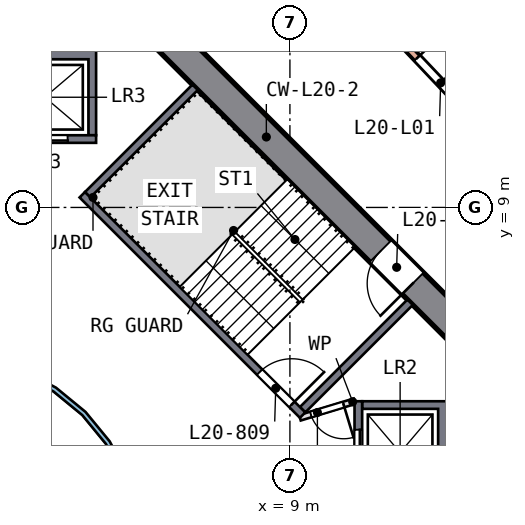
"""IFC4 building model, lengths in metres.
Left out: names, types, materials, properties, quantities, classifications, styles, units other than length and angle.
Written with IfcOpenShell. Run it as: python <this file> out.ifc"""

import sys

from ifc_helpers import new_model, si_unit, direction, frame, frame_2d, origin, place, context, subcontext, project, spatial, polyline, rectangle, outline, extrude, element, fill, save


model = new_model("IFC4")
c1 = context("Model", 3, precision=1e-05, world=origin(), true_north=direction((0.0, 1.0)))
c2 = subcontext(c1, "Body", "Model", "MODEL_VIEW")
j1 = project(units=[si_unit("LENGTHUNIT", "METRE"), si_unit("PLANEANGLEUNIT", "RADIAN")], contexts=[c1])
p1 = place(None, origin())
s1 = spatial("IfcSite", under=j1, at=p1, CompositionType="ELEMENT")
p2 = place(p1, origin())
s2 = spatial("IfcBuilding", under=s1, at=p2, CompositionType="ELEMENT")
p3 = place(p2, frame((0.0, 0.0, 89.5)))
s3 = spatial("IfcBuildingStorey", under=s2, at=p3, CompositionType="ELEMENT", Elevation=89.5)
p4 = place(p3, frame((13.717, 5.516, 0.0), z_axis=(0.0, 0.0, 1.0), x_axis=(-0.707106781, 0.707106781, 0.0)))
e1 = element("IfcWall", 1, at=p4, inside=s3, PredefinedType="SHEAR", context=c2, shape_type="SweptSolid", body=[
    extrude(rectangle(XDim=11.598, YDim=0.8, at=frame_2d((5.799, 0.0))), origin(), (0.0, 0.0, 1.0), 3.5),
])
p5 = place(p4, frame((2.099, 0.0, 0.0)))
e2 = element("IfcOpeningElement", 2, at=p5, cuts=e1, PredefinedType="OPENING", context=c2, shape_type="SweptSolid", body=[
    extrude(rectangle(XDim=1.2, YDim=2.1, at=frame_2d((0.6, 1.05))), frame((0.0, 0.41, 0.0), z_axis=(0.0, -1.0, 0.0), x_axis=(1.0, 0.0, 0.0)), (0.0, 0.0, 1.0), 0.82),
])
p6 = place(p3, frame((8.498, 16.999, 0.0), z_axis=(0.0, 0.0, 1.0), x_axis=(0.687585757, -0.726103179, 0.0)))
e3 = element("IfcWall", 3, at=p6, inside=s3, PredefinedType="SOLIDWALL", context=c2, shape_type="SweptSolid", body=[
    extrude(rectangle(XDim=13.0, YDim=0.2, at=frame_2d((6.5, 0.0))), origin(), (0.0, 0.0, 1.0), 3.19),
])
p7 = place(p6, frame((5.6, 0.0, 0.0)))
e4 = element("IfcOpeningElement", 4, at=p7, cuts=e3, PredefinedType="OPENING", context=c2, shape_type="SweptSolid", body=[
    extrude(rectangle(XDim=1.8, YDim=2.4, at=frame_2d((0.9, 1.2))), frame((0.0, 0.11, 0.0), z_axis=(0.0, -1.0, 0.0), x_axis=(1.0, 0.0, 0.0)), (0.0, 0.0, 1.0), 0.22),
])
p8 = place(p3, origin())
e5 = element("IfcWall", 5, at=p8, inside=s3, PredefinedType="SOLIDWALL", context=c2, shape_type="SweptSolid", body=[
    extrude(outline(polyline([(13.2, 3.9), (13.2, 1.2), (10.9, 1.2), (10.9, 1.4), (12.9, 1.4), (12.9, 3.7), (10.9, 3.7), (10.9, 3.9), (13.2, 3.9)])), origin(), (0.0, 0.0, 1.0), 3.19),
])
p9 = place(p3, frame((10.8, 1.2, 0.0), z_axis=(0.0, 0.0, 1.0), x_axis=(0.0, 1.0, 0.0)))
e6 = element("IfcWall", 6, at=p9, inside=s3, PredefinedType="SOLIDWALL", context=c2, shape_type="SweptSolid", body=[
    extrude(rectangle(XDim=2.7, YDim=0.2, at=frame_2d((1.35, 0.0))), origin(), (0.0, 0.0, 1.0), 3.19),
])
p10 = place(p9, frame((0.75, 0.0, 0.0)))
e7 = element("IfcOpeningElement", 7, at=p10, cuts=e6, PredefinedType="OPENING", context=c2, shape_type="SweptSolid", body=[
    extrude(rectangle(XDim=1.2, YDim=2.1, at=frame_2d((0.6, 1.05))), frame((0.0, 0.11, 0.0), z_axis=(0.0, -1.0, 0.0), x_axis=(1.0, 0.0, 0.0)), (0.0, 0.0, 1.0), 0.22),
])
p11 = place(p3, origin())
e8 = element("IfcWall", 8, at=p11, inside=s3, PredefinedType="SOLIDWALL", context=c2, shape_type="SweptSolid", body=[
    extrude(outline(polyline([(3.9, 13.2), (3.9, 10.9), (3.7, 10.9), (3.7, 12.9), (1.4, 12.9), (1.4, 10.9), (1.2, 10.9), (1.2, 13.2), (3.9, 13.2)])), origin(), (0.0, 0.0, 1.0), 3.19),
])
p12 = place(p3, frame((1.2, 10.8, 0.0), z_axis=(0.0, 0.0, 1.0), x_axis=(1.0, 0.0, 0.0)))
e9 = element("IfcWall", 9, at=p12, inside=s3, PredefinedType="SOLIDWALL", context=c2, shape_type="SweptSolid", body=[
    extrude(rectangle(XDim=2.7, YDim=0.2, at=frame_2d((1.35, 0.0))), origin(), (0.0, 0.0, 1.0), 3.19),
])
p13 = place(p12, frame((0.75, 0.0, 0.0)))
e10 = element("IfcOpeningElement", 10, at=p13, cuts=e9, PredefinedType="OPENING", context=c2, shape_type="SweptSolid", body=[
    extrude(rectangle(XDim=1.2, YDim=2.1, at=frame_2d((0.6, 1.05))), frame((0.0, 0.11, 0.0), z_axis=(0.0, -1.0, 0.0), x_axis=(1.0, 0.0, 0.0)), (0.0, 0.0, 1.0), 0.22),
])
p14 = place(p3, frame((3.535, 9.334, 0.0), z_axis=(0.0, 0.0, 1.0), x_axis=(0.707106781, -0.707106781, 0.0)))
e11 = element("IfcWall", 11, at=p14, inside=s3, PredefinedType="SOLIDWALL", context=c2, shape_type="SweptSolid", body=[
    extrude(rectangle(XDim=8.2, YDim=0.2, at=frame_2d((4.1, 0.0))), origin(), (0.0, 0.0, 1.0), 3.19),
])
p15 = place(p14, frame((6.6, 0.0, 0.0)))
e12 = element("IfcOpeningElement", 12, at=p15, cuts=e11, PredefinedType="OPENING", context=c2, shape_type="SweptSolid", body=[
    extrude(rectangle(XDim=1.2, YDim=2.1, at=frame_2d((0.6, 1.05))), frame((0.0, 0.11, 0.0), z_axis=(0.0, -1.0, 0.0), x_axis=(1.0, 0.0, 0.0)), (0.0, 0.0, 1.0), 0.22),
])
for number, where, z_axis, x_axis in (
    (13, (9.334, 3.677, 0.0), (0.0, 0.0, 1.0), (0.707, 0.707, 0.0)),
    (14, (3.677, 9.334, 0.0), (0.0, 0.0, 1.0), (0.707, 0.707, 0.0)),
):
    element("IfcWall", number, at=place(p3, frame(where, z_axis=z_axis, x_axis=x_axis)), inside=s3, PredefinedType="SOLIDWALL", context=c2, shape_type="SweptSolid", body=[
        extrude(rectangle(XDim=4.0, YDim=0.2, at=frame_2d((2.0, 0.0))), origin(), (0.0, 0.0, 1.0), 3.19),
    ])
p16 = place(p3, frame((10.7, 3.9, 0.0), z_axis=(0.0, 0.0, 1.0), x_axis=(-0.957084567, -0.289808785, 0.0)))
e15 = element("IfcWall", 15, at=p16, inside=s3, PredefinedType="PARTITIONING", context=c2, shape_type="SweptSolid", body=[
    extrude(rectangle(XDim=1.501, YDim=0.15, at=frame_2d((0.75, 0.0))), origin(), (0.0, 0.0, 1.0), 3.19),
])
p17 = place(p16, frame((0.301, 0.0, 0.0)))
e16 = element("IfcOpeningElement", 16, at=p17, cuts=e15, PredefinedType="OPENING", context=c2, shape_type="SweptSolid", body=[
    extrude(rectangle(XDim=0.9, YDim=2.1, at=frame_2d((0.45, 1.05))), frame((0.0, 0.085, 0.0), z_axis=(0.0, -1.0, 0.0), x_axis=(1.0, 0.0, 0.0)), (0.0, 0.0, 1.0), 0.17),
])
p18 = place(p3, origin())
e17 = element("IfcWall", 17, at=p18, inside=s3, PredefinedType="SOLIDWALL", context=c2, shape_type="SweptSolid", body=[
    extrude(outline(polyline([(5.021, -0.999), (4.73, -1.959), (4.257, -2.844), (3.62, -3.62), (2.844, -4.257), (1.959, -4.73), (0.999, -5.021), (0.0, -5.12), (-0.999, -5.021), (-1.959, -4.73), (-2.844, -4.257), (-3.62, -3.62), (-4.257, -2.844), (-4.73, -1.959), (-5.021, -0.999), (-5.12, 0.0), (-5.021, 0.999), (-4.73, 1.959), (-4.257, 2.844), (-3.62, 3.62), (-2.844, 4.257), (-1.959, 4.73), (-0.999, 5.021), (0.0, 5.12), (0.999, 5.021), (1.959, 4.73), (2.844, 4.257), (3.62, 3.62), (4.257, 2.844), (4.73, 1.959), (5.021, 0.999), (5.12, 0.0), (5.021, -0.999)]), holes=[polyline([(4.904, 0.976), (4.619, 1.913), (4.157, 2.778), (3.535, 3.535), (2.778, 4.157), (1.913, 4.619), (0.976, 4.904), (0.0, 5.0), (-0.976, 4.904), (-1.913, 4.619), (-2.778, 4.157), (-3.535, 3.535), (-4.157, 2.778), (-4.619, 1.913), (-4.904, 0.976), (-5.0, 0.0), (-4.904, -0.976), (-4.619, -1.913), (-4.157, -2.778), (-3.535, -3.535), (-2.778, -4.157), (-1.913, -4.619), (-0.976, -4.904), (0.0, -5.0), (0.976, -4.904), (1.913, -4.619), (2.778, -4.157), (3.535, -3.535), (4.157, -2.778), (4.619, -1.913), (4.904, -0.976), (5.0, 0.0), (4.904, 0.976)])]), origin(), (0.0, 0.0, 1.0), 3.19),
])
p19 = place(p7, origin())
e18 = element("IfcDoor", 18, at=p19, inside=s3, OperationType="DOUBLE_DOOR_SINGLE_SWING", PredefinedType="DOOR", context=c2, shape_type="SweptSolid", body=[
    extrude(rectangle(XDim=1.8, YDim=2.4, at=frame_2d((0.9, 1.2))), frame((0.0, 0.025, 0.0), z_axis=(0.0, -1.0, 0.0), x_axis=(1.0, 0.0, 0.0)), (0.0, 0.0, 1.0), 0.05),
])
fill(e4, e18)
p20 = place(p10, origin())
e19 = element("IfcDoor", 19, at=p20, inside=s3, OperationType="DOUBLE_DOOR_SLIDING", PredefinedType="DOOR", context=c2, shape_type="SweptSolid", body=[
    extrude(rectangle(XDim=1.2, YDim=2.1, at=frame_2d((0.6, 1.05))), frame((0.0, 0.025, 0.0), z_axis=(0.0, -1.0, 0.0), x_axis=(1.0, 0.0, 0.0)), (0.0, 0.0, 1.0), 0.05),
])
fill(e7, e19)
p21 = place(p13, origin())
e20 = element("IfcDoor", 20, at=p21, inside=s3, OperationType="DOUBLE_DOOR_SLIDING", PredefinedType="DOOR", context=c2, shape_type="SweptSolid", body=[
    extrude(rectangle(XDim=1.2, YDim=2.1, at=frame_2d((0.6, 1.05))), frame((0.0, 0.025, 0.0), z_axis=(0.0, -1.0, 0.0), x_axis=(1.0, 0.0, 0.0)), (0.0, 0.0, 1.0), 0.05),
])
fill(e10, e20)
p22 = place(p15, origin())
e21 = element("IfcDoor", 21, at=p22, inside=s3, OperationType="SINGLE_SWING_RIGHT", PredefinedType="DOOR", context=c2, shape_type="SweptSolid", body=[
    extrude(rectangle(XDim=1.2, YDim=2.1, at=frame_2d((0.6, 1.05))), frame((0.0, 0.025, 0.0), z_axis=(0.0, -1.0, 0.0), x_axis=(1.0, 0.0, 0.0)), (0.0, 0.0, 1.0), 0.05),
])
fill(e12, e21)
p23 = place(p5, origin())
e22 = element("IfcDoor", 22, at=p23, inside=s3, OperationType="SINGLE_SWING_LEFT", PredefinedType="DOOR", context=c2, shape_type="SweptSolid", body=[
    extrude(rectangle(XDim=1.2, YDim=2.1, at=frame_2d((0.6, 1.05))), frame((0.0, 0.025, 0.0), z_axis=(0.0, -1.0, 0.0), x_axis=(1.0, 0.0, 0.0)), (0.0, 0.0, 1.0), 0.05),
])
fill(e2, e22)
p24 = place(p17, origin())
e23 = element("IfcDoor", 23, at=p24, inside=s3, OperationType="SINGLE_SWING_LEFT", PredefinedType="DOOR", context=c2, shape_type="SweptSolid", body=[
    extrude(rectangle(XDim=0.9, YDim=2.1, at=frame_2d((0.45, 1.05))), frame((0.0, 0.025, 0.0), z_axis=(0.0, -1.0, 0.0), x_axis=(1.0, 0.0, 0.0)), (0.0, 0.0, 1.0), 0.05),
])
fill(e16, e23)
save(model, sys.argv[1])
